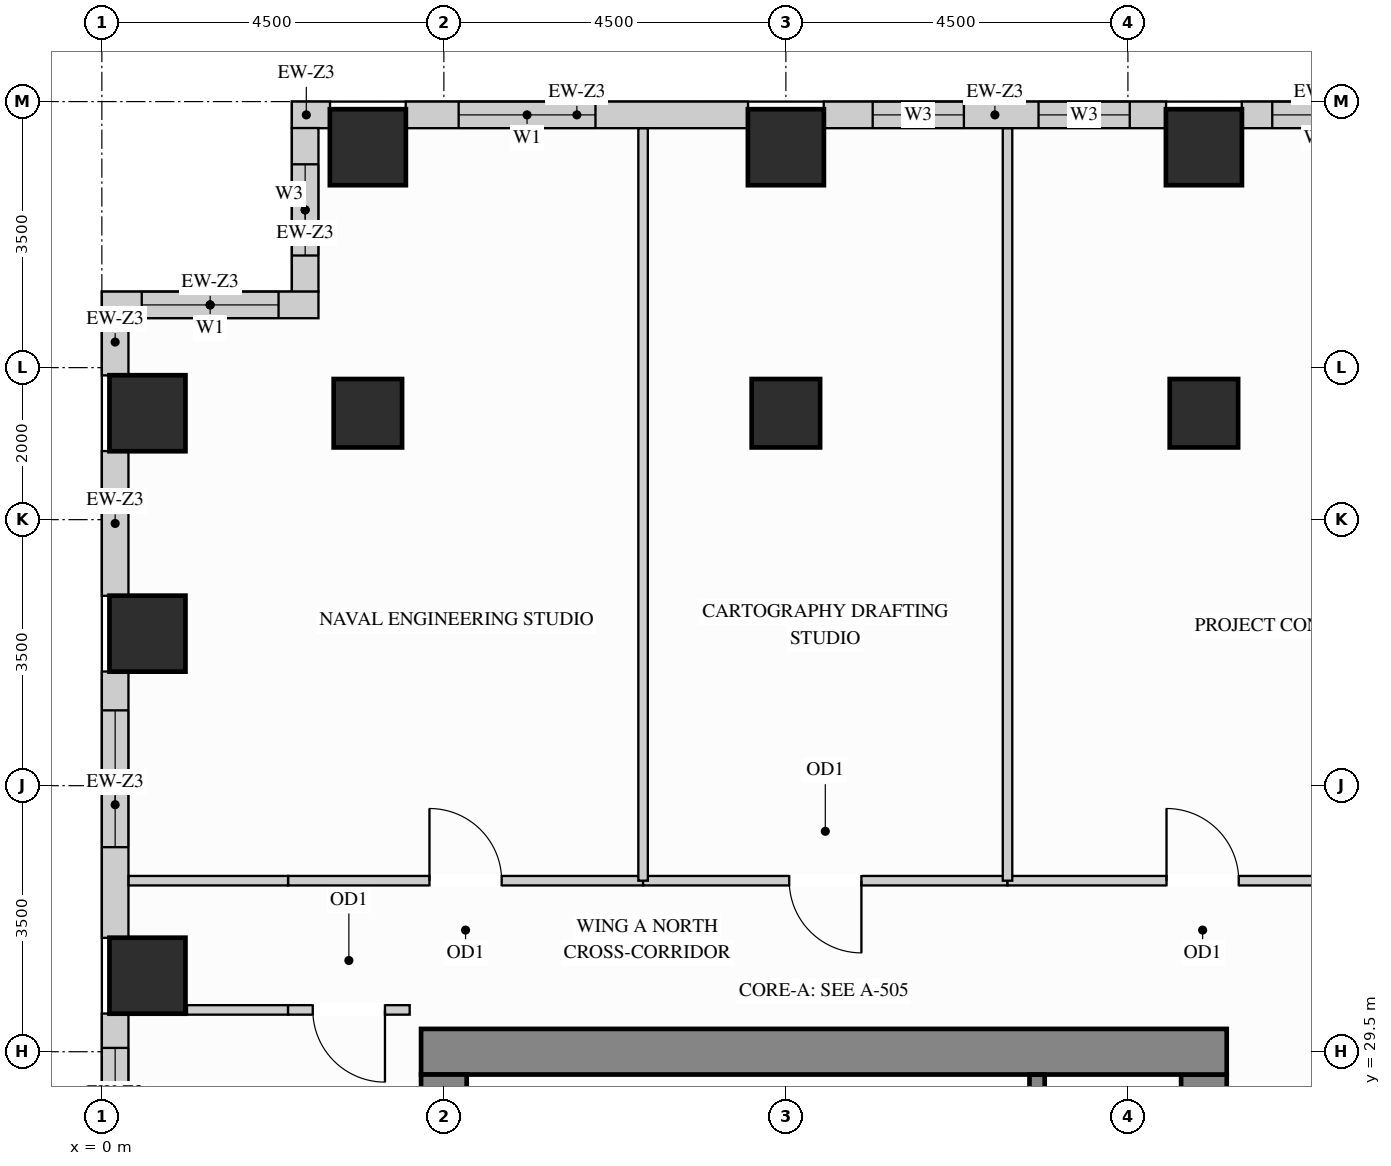
"""IFC4 building model, lengths in metres.
Left out: names, types, materials, properties, quantities, classifications, styles, units other than length and angle.
Written with IfcOpenShell. Run it as: python <this file> out.ifc"""

import sys

from ifc_helpers import new_model, si_unit, direction, frame, frame_2d, origin, origin_2d, place, context, subcontext, project, spatial, rectangle, extrude, source, transform, mapped, element, fill, save


model = new_model("IFC4")
c1 = context("Model", 3, precision=1e-05, world=origin(), true_north=direction((0.0, 1.0)))
c2 = subcontext(c1, "Body", "Model", "MODEL_VIEW")
j1 = project(units=[si_unit("LENGTHUNIT", "METRE"), si_unit("PLANEANGLEUNIT", "RADIAN")], contexts=[c1])
p1 = place(None, origin())
s1 = spatial("IfcSite", under=j1, at=p1, CompositionType="ELEMENT")
p2 = place(p1, origin())
s2 = spatial("IfcBuilding", under=s1, at=p2, CompositionType="ELEMENT")
p3 = place(p2, frame((0.0, 0.0, 200.7)))
s3 = spatial("IfcBuildingStorey", under=s2, at=p3, CompositionType="ELEMENT", Elevation=200.7)
m1 = source(origin(), c2, "Body", "SweptSolid", [
    extrude(rectangle(XDim=0.9, YDim=0.9, at=origin_2d()), origin(), (0.0, 0.0, 1.0), 3.4),
])
for number, where, z_axis, x_axis in (
    (1, (14.5, 37.9, 0.0), (0.0, 0.0, 1.0), (1.0, 0.0, 0.0)),
    (2, (3.5, 37.9, 0.0), (0.0, 0.0, 1.0), (1.0, 0.0, 0.0)),
    (3, (9.0, 37.9, 0.0), (0.0, 0.0, 1.0), (1.0, 0.0, 0.0)),
):
    element("IfcColumn", number, at=place(p3, frame(where, z_axis=z_axis, x_axis=x_axis)), inside=s3, PredefinedType="COLUMN", context=c2, shape_type="MappedRepresentation", body=[
        mapped(m1, transform((0.0, 0.0, 0.0), x_axis=(1.0, 0.0, 0.0), y_axis=(0.0, 1.0, 0.0), z_axis=(0.0, 0.0, 1.0))),
    ])
m2 = source(origin(), c2, "Body", "SweptSolid", [
    extrude(rectangle(XDim=1.0, YDim=1.0, at=origin_2d()), origin(), (0.0, 0.0, 1.0), 3.4),
])
for number, where, z_axis, x_axis in (
    (4, (14.5, 41.4, 0.0), (0.0, 0.0, 1.0), (1.0, 0.0, 0.0)),
    (5, (3.5, 41.4, 0.0), (0.0, 0.0, 1.0), (1.0, 0.0, 0.0)),
    (6, (9.0, 41.4, 0.0), (0.0, 0.0, 1.0), (1.0, 0.0, 0.0)),
    (7, (0.6, 30.5, 0.0), (0.0, 0.0, 1.0), (1.0, 0.0, 0.0)),
    (8, (0.6, 35.0, 0.0), (0.0, 0.0, 1.0), (1.0, 0.0, 0.0)),
    (9, (0.6, 37.9, 0.0), (0.0, 0.0, 1.0), (1.0, 0.0, 0.0)),
):
    element("IfcColumn", number, at=place(p3, frame(where, z_axis=z_axis, x_axis=x_axis)), inside=s3, PredefinedType="COLUMN", context=c2, shape_type="MappedRepresentation", body=[
        mapped(m2, transform((0.0, 0.0, 0.0), x_axis=(1.0, 0.0, 0.0), y_axis=(0.0, 1.0, 0.0), z_axis=(0.0, 0.0, 1.0))),
    ])
m3 = source(origin(), c2, "Body", "SweptSolid", [
    extrude(rectangle(XDim=8.32, YDim=0.6, at=frame_2d((4.16, 0.0))), origin(), (0.0, 0.0, 1.0), 3.4),
])
p4 = place(p3, frame((14.5, 20.88, 0.0), z_axis=(0.0, 0.0, 1.0), x_axis=(0.0, 1.0, 0.0)))
e10 = element("IfcWall", 10, at=p4, inside=s3, PredefinedType="SHEAR", context=c2, shape_type="MappedRepresentation", body=[
    mapped(m3, transform((0.0, 0.0, 0.0), x_axis=(1.0, 0.0, 0.0), y_axis=(0.0, 1.0, 0.0), z_axis=(0.0, 0.0, 1.0))),
])
m4 = source(origin(), c2, "Body", "SweptSolid", [
    extrude(rectangle(XDim=10.6, YDim=0.6, at=frame_2d((5.3, 0.0))), origin(), (0.0, 0.0, 1.0), 3.4),
])
p5 = place(p3, frame((4.2, 29.5, 0.0), z_axis=(0.0, 0.0, 1.0), x_axis=(1.0, 0.0, 0.0)))
e11 = element("IfcWall", 11, at=p5, inside=s3, PredefinedType="SHEAR", context=c2, shape_type="MappedRepresentation", body=[
    mapped(m4, transform((0.0, 0.0, 0.0), x_axis=(1.0, 0.0, 0.0), y_axis=(0.0, 1.0, 0.0), z_axis=(0.0, 0.0, 1.0))),
])
m5 = source(origin(), c2, "Body", "SweptSolid", [
    extrude(rectangle(XDim=20.4, YDim=0.6, at=frame_2d((10.2, 0.0))), origin(), (0.0, 0.0, 1.0), 3.4),
])
p6 = place(p3, frame((4.5, 8.8, 0.0), z_axis=(0.0, 0.0, 1.0), x_axis=(0.0, 1.0, 0.0)))
e12 = element("IfcWall", 12, at=p6, inside=s3, PredefinedType="SHEAR", context=c2, shape_type="MappedRepresentation", body=[
    mapped(m5, transform((0.0, 0.0, 0.0), x_axis=(1.0, 0.0, 0.0), y_axis=(0.0, 1.0, 0.0), z_axis=(0.0, 0.0, 1.0))),
])
p7 = place(p3, frame((17.0, 41.825, 0.0), z_axis=(0.0, 0.0, 1.0), x_axis=(-1.0, 0.0, 0.0)))
e13 = element("IfcWall", 13, at=p7, inside=s3, PredefinedType="SOLIDWALL", context=c2, shape_type="SweptSolid", body=[
    extrude(rectangle(XDim=2.002, YDim=0.35, at=frame_2d((1.001, 0.0))), origin(), (0.0, 0.0, 1.0), 3.385),
])
p8 = place(p7, frame((0.401, 0.0, 0.78)))
e14 = element("IfcOpeningElement", 14, at=p8, cuts=e13, PredefinedType="OPENING", context=c2, shape_type="SweptSolid", body=[
    extrude(rectangle(XDim=1.2, YDim=2.1, at=frame_2d((0.6, 1.05))), frame((0.0, 0.185, 0.0), z_axis=(0.0, -1.0, 0.0), x_axis=(1.0, 0.0, 0.0)), (0.0, 0.0, 1.0), 0.37),
])
p9 = place(p3, frame((14.002, 41.825, 0.0), z_axis=(0.0, 0.0, 1.0), x_axis=(-1.0, 0.0, 0.0)))
e15 = element("IfcWall", 15, at=p9, inside=s3, PredefinedType="SOLIDWALL", context=c2, shape_type="SweptSolid", body=[
    extrude(rectangle(XDim=4.504, YDim=0.35, at=frame_2d((2.252, 0.0))), origin(), (0.0, 0.0, 1.0), 2.612),
])
p10 = place(p9, frame((0.478, 0.0, 0.78)))
e16 = element("IfcOpeningElement", 16, at=p10, cuts=e15, PredefinedType="OPENING", context=c2, shape_type="SweptSolid", body=[
    extrude(rectangle(XDim=1.2, YDim=1.652, at=frame_2d((0.6, 0.826))), frame((0.0, 0.185, 0.0), z_axis=(0.0, -1.0, 0.0), x_axis=(1.0, 0.0, 0.0)), (0.0, 0.0, 1.0), 0.37),
])
p11 = place(p9, frame((2.66, 0.0, 0.78)))
e17 = element("IfcOpeningElement", 17, at=p11, cuts=e15, PredefinedType="OPENING", context=c2, shape_type="SweptSolid", body=[
    extrude(rectangle(XDim=1.2, YDim=1.652, at=frame_2d((0.6, 0.826))), frame((0.0, 0.185, 0.0), z_axis=(0.0, -1.0, 0.0), x_axis=(1.0, 0.0, 0.0)), (0.0, 0.0, 1.0), 0.37),
])
p12 = place(p3, frame((8.502, 41.825, 0.0), z_axis=(0.0, 0.0, 1.0), x_axis=(-1.0, 0.0, 0.0)))
e18 = element("IfcWall", 18, at=p12, inside=s3, PredefinedType="SOLIDWALL", context=c2, shape_type="SweptSolid", body=[
    extrude(rectangle(XDim=4.504, YDim=0.35, at=frame_2d((2.252, 0.0))), origin(), (0.0, 0.0, 1.0), 2.612),
])
p13 = place(p12, frame((2.008, 0.0, 0.78)))
e19 = element("IfcOpeningElement", 19, at=p13, cuts=e18, PredefinedType="OPENING", context=c2, shape_type="SweptSolid", body=[
    extrude(rectangle(XDim=1.8, YDim=1.652, at=frame_2d((0.9, 0.826))), frame((0.0, 0.185, 0.0), z_axis=(0.0, -1.0, 0.0), x_axis=(1.0, 0.0, 0.0)), (0.0, 0.0, 1.0), 0.37),
])
m6 = source(origin(), c2, "Body", "SweptSolid", [
    extrude(rectangle(XDim=0.502, YDim=0.35, at=frame_2d((0.251, 0.0))), origin(), (0.0, 0.0, 1.0), 3.385),
])
p14 = place(p3, frame((3.002, 41.825, 0.0), z_axis=(0.0, 0.0, 1.0), x_axis=(-1.0, 0.0, 0.0)))
e20 = element("IfcWall", 20, at=p14, inside=s3, PredefinedType="SOLIDWALL", context=c2, shape_type="MappedRepresentation", body=[
    mapped(m6, transform((0.0, 0.0, 0.0), x_axis=(1.0, 0.0, 0.0), y_axis=(0.0, 1.0, 0.0), z_axis=(0.0, 0.0, 1.0))),
])
p15 = place(p3, frame((2.675, 41.652, 0.0), z_axis=(0.0, 0.0, 1.0), x_axis=(0.0, -1.0, 0.0)))
e21 = element("IfcWall", 21, at=p15, inside=s3, PredefinedType="SOLIDWALL", context=c2, shape_type="SweptSolid", body=[
    extrude(rectangle(XDim=2.154, YDim=0.35, at=frame_2d((1.077, 0.0))), origin(), (0.0, 0.0, 1.0), 3.385),
])
p16 = place(p15, frame((0.477, 0.0, 0.78)))
e22 = element("IfcOpeningElement", 22, at=p16, cuts=e21, PredefinedType="OPENING", context=c2, shape_type="SweptSolid", body=[
    extrude(rectangle(XDim=1.2, YDim=2.1, at=frame_2d((0.6, 1.05))), frame((0.0, 0.185, 0.0), z_axis=(0.0, -1.0, 0.0), x_axis=(1.0, 0.0, 0.0)), (0.0, 0.0, 1.0), 0.37),
])
p17 = place(p3, frame((2.85, 39.325, 0.0), z_axis=(0.0, 0.0, 1.0), x_axis=(-1.0, 0.0, 0.0)))
e23 = element("IfcWall", 23, at=p17, inside=s3, PredefinedType="SOLIDWALL", context=c2, shape_type="SweptSolid", body=[
    extrude(rectangle(XDim=2.85, YDim=0.35, at=frame_2d((1.425, 0.0))), origin(), (0.0, 0.0, 1.0), 3.385),
])
p18 = place(p17, frame((0.525, 0.0, 0.78)))
e24 = element("IfcOpeningElement", 24, at=p18, cuts=e23, PredefinedType="OPENING", context=c2, shape_type="SweptSolid", body=[
    extrude(rectangle(XDim=1.8, YDim=2.1, at=frame_2d((0.9, 1.05))), frame((0.0, 0.185, 0.0), z_axis=(0.0, -1.0, 0.0), x_axis=(1.0, 0.0, 0.0)), (0.0, 0.0, 1.0), 0.37),
])
m7 = source(origin(), c2, "Body", "SweptSolid", [
    extrude(rectangle(XDim=0.754, YDim=0.35, at=frame_2d((0.377, 0.0))), origin(), (0.0, 0.0, 1.0), 3.385),
])
p19 = place(p3, frame((0.175, 39.152, 0.0), z_axis=(0.0, 0.0, 1.0), x_axis=(0.0, -1.0, 0.0)))
e25 = element("IfcWall", 25, at=p19, inside=s3, PredefinedType="SOLIDWALL", context=c2, shape_type="MappedRepresentation", body=[
    mapped(m7, transform((0.0, 0.0, 0.0), x_axis=(1.0, 0.0, 0.0), y_axis=(0.0, 1.0, 0.0), z_axis=(0.0, 0.0, 1.0))),
])
m8 = source(origin(), c2, "Body", "SweptSolid", [
    extrude(rectangle(XDim=1.904, YDim=0.35, at=frame_2d((0.952, 0.0))), origin(), (0.0, 0.0, 1.0), 2.612),
])
p20 = place(p3, frame((0.175, 37.402, 0.0), z_axis=(0.0, 0.0, 1.0), x_axis=(0.0, -1.0, 0.0)))
e26 = element("IfcWall", 26, at=p20, inside=s3, PredefinedType="SOLIDWALL", context=c2, shape_type="MappedRepresentation", body=[
    mapped(m8, transform((0.0, 0.0, 0.0), x_axis=(1.0, 0.0, 0.0), y_axis=(0.0, 1.0, 0.0), z_axis=(0.0, 0.0, 1.0))),
])
p21 = place(p3, frame((0.175, 34.502, 0.0), z_axis=(0.0, 0.0, 1.0), x_axis=(0.0, -1.0, 0.0)))
e27 = element("IfcWall", 27, at=p21, inside=s3, PredefinedType="SOLIDWALL", context=c2, shape_type="SweptSolid", body=[
    extrude(rectangle(XDim=3.504, YDim=0.35, at=frame_2d((1.752, 0.0))), origin(), (0.0, 0.0, 1.0), 2.612),
])
p22 = place(p21, frame((0.511, 0.0, 0.78)))
e28 = element("IfcOpeningElement", 28, at=p22, cuts=e27, PredefinedType="OPENING", context=c2, shape_type="SweptSolid", body=[
    extrude(rectangle(XDim=1.8, YDim=1.652, at=frame_2d((0.9, 0.826))), frame((0.0, 0.185, 0.0), z_axis=(0.0, -1.0, 0.0), x_axis=(1.0, 0.0, 0.0)), (0.0, 0.0, 1.0), 0.37),
])
p23 = place(p3, frame((0.175, 30.002, 0.0), z_axis=(0.0, 0.0, 1.0), x_axis=(0.0, -1.0, 0.0)))
e29 = element("IfcWall", 29, at=p23, inside=s3, PredefinedType="SOLIDWALL", context=c2, shape_type="SweptSolid", body=[
    extrude(rectangle(XDim=2.704, YDim=0.35, at=frame_2d((1.352, 0.0))), origin(), (0.0, 0.0, 1.0), 2.612),
])
p24 = place(p23, frame((0.452, 0.0, 0.78)))
e30 = element("IfcOpeningElement", 30, at=p24, cuts=e29, PredefinedType="OPENING", context=c2, shape_type="SweptSolid", body=[
    extrude(rectangle(XDim=1.8, YDim=1.652, at=frame_2d((0.9, 0.826))), frame((0.0, 0.185, 0.0), z_axis=(0.0, -1.0, 0.0), x_axis=(1.0, 0.0, 0.0)), (0.0, 0.0, 1.0), 0.37),
])
p25 = place(p3, frame((2.45, 31.75, 0.0), z_axis=(0.0, 0.0, 1.0), x_axis=(1.0, 0.0, 0.0)))
e31 = element("IfcWall", 31, at=p25, inside=s3, PredefinedType="PARTITIONING", context=c2, shape_type="SweptSolid", body=[
    extrude(rectangle(XDim=4.671, YDim=0.125, at=frame_2d((2.335, 0.0))), origin(), (0.0, 0.0, 1.0), 2.848),
])
p26 = place(p25, frame((1.861, 0.0, 0.0)))
e32 = element("IfcOpeningElement", 32, at=p26, cuts=e31, PredefinedType="OPENING", context=c2, shape_type="SweptSolid", body=[
    extrude(rectangle(XDim=0.95, YDim=2.15, at=frame_2d((0.475, 1.075))), frame((0.0, 0.073, 0.0), z_axis=(0.0, -1.0, 0.0), x_axis=(1.0, 0.0, 0.0)), (0.0, 0.0, 1.0), 0.145),
])
p27 = place(p3, frame((7.121, 31.75, 0.0), z_axis=(0.0, 0.0, 1.0), x_axis=(1.0, 0.0, 0.0)))
e33 = element("IfcWall", 33, at=p27, inside=s3, PredefinedType="PARTITIONING", context=c2, shape_type="SweptSolid", body=[
    extrude(rectangle(XDim=4.795, YDim=0.125, at=frame_2d((2.397, 0.0))), origin(), (0.0, 0.0, 1.0), 2.848),
])
p28 = place(p27, frame((1.923, 0.0, 0.0)))
e34 = element("IfcOpeningElement", 34, at=p28, cuts=e33, PredefinedType="OPENING", context=c2, shape_type="SweptSolid", body=[
    extrude(rectangle(XDim=0.95, YDim=2.15, at=frame_2d((0.475, 1.075))), frame((0.0, 0.073, 0.0), z_axis=(0.0, -1.0, 0.0), x_axis=(1.0, 0.0, 0.0)), (0.0, 0.0, 1.0), 0.145),
])
p29 = place(p3, frame((11.916, 31.75, 0.0), z_axis=(0.0, 0.0, 1.0), x_axis=(1.0, 0.0, 0.0)))
e35 = element("IfcWall", 35, at=p29, inside=s3, PredefinedType="PARTITIONING", context=c2, shape_type="SweptSolid", body=[
    extrude(rectangle(XDim=5.134, YDim=0.125, at=frame_2d((2.567, 0.0))), origin(), (0.0, 0.0, 1.0), 2.848),
])
p30 = place(p29, frame((2.092, 0.0, 0.0)))
e36 = element("IfcOpeningElement", 36, at=p30, cuts=e35, PredefinedType="OPENING", context=c2, shape_type="SweptSolid", body=[
    extrude(rectangle(XDim=0.95, YDim=2.15, at=frame_2d((0.475, 1.075))), frame((0.0, 0.073, 0.0), z_axis=(0.0, -1.0, 0.0), x_axis=(1.0, 0.0, 0.0)), (0.0, 0.0, 1.0), 0.145),
])
m9 = source(origin(), c2, "Body", "SweptSolid", [
    extrude(rectangle(XDim=2.098, YDim=0.125, at=frame_2d((1.049, 0.0))), origin(), (0.0, 0.0, 1.0), 2.848),
])
p31 = place(p3, frame((0.352, 31.75, 0.0), z_axis=(0.0, 0.0, 1.0), x_axis=(1.0, 0.0, 0.0)))
e37 = element("IfcWall", 37, at=p31, inside=s3, PredefinedType="PARTITIONING", context=c2, shape_type="MappedRepresentation", body=[
    mapped(m9, transform((0.0, 0.0, 0.0), x_axis=(1.0, 0.0, 0.0), y_axis=(0.0, 1.0, 0.0), z_axis=(0.0, 0.0, 1.0))),
])
m10 = source(origin(), c2, "Body", "SweptSolid", [
    extrude(rectangle(XDim=9.898, YDim=0.125, at=frame_2d((4.949, 0.0))), origin(), (0.0, 0.0, 1.0), 3.385),
])
for number, where, z_axis, x_axis in (
    (38, (7.121, 31.75, 0.0), (0.0, 0.0, 1.0), (0.0, 1.0, 0.0)),
    (39, (11.916, 31.75, 0.0), (0.0, 0.0, 1.0), (0.0, 1.0, 0.0)),
):
    element("IfcWall", number, at=place(p3, frame(where, z_axis=z_axis, x_axis=x_axis)), inside=s3, PredefinedType="PARTITIONING", context=c2, shape_type="MappedRepresentation", body=[
        mapped(m10, transform((0.0, 0.0, 0.0), x_axis=(1.0, 0.0, 0.0), y_axis=(0.0, 1.0, 0.0), z_axis=(0.0, 0.0, 1.0))),
    ])
m11 = source(origin(), c2, "Body", "SweptSolid", [
    extrude(rectangle(XDim=1.33, YDim=0.125, at=frame_2d((0.665, 0.0))), origin(), (0.0, 0.0, 1.0), 3.385),
])
p32 = place(p3, frame((1.12, 30.05, 0.0), z_axis=(0.0, 0.0, 1.0), x_axis=(1.0, 0.0, 0.0)))
e40 = element("IfcWall", 40, at=p32, inside=s3, PredefinedType="PARTITIONING", context=c2, shape_type="MappedRepresentation", body=[
    mapped(m11, transform((0.0, 0.0, 0.0), x_axis=(1.0, 0.0, 0.0), y_axis=(0.0, 1.0, 0.0), z_axis=(0.0, 0.0, 1.0))),
])
p33 = place(p3, frame((2.45, 30.05, 0.0), z_axis=(0.0, 0.0, 1.0), x_axis=(1.0, 0.0, 0.0)))
e41 = element("IfcWall", 41, at=p33, inside=s3, PredefinedType="PARTITIONING", context=c2, shape_type="SweptSolid", body=[
    extrude(rectangle(XDim=1.6, YDim=0.125, at=frame_2d((0.8, 0.0))), origin(), (0.0, 0.0, 1.0), 3.385),
])
p34 = place(p33, frame((0.325, 0.0, 0.0)))
e42 = element("IfcOpeningElement", 42, at=p34, cuts=e41, PredefinedType="OPENING", context=c2, shape_type="SweptSolid", body=[
    extrude(rectangle(XDim=0.95, YDim=2.15, at=frame_2d((0.475, 1.075))), frame((0.0, 0.073, 0.0), z_axis=(0.0, -1.0, 0.0), x_axis=(1.0, 0.0, 0.0)), (0.0, 0.0, 1.0), 0.145),
])
m12 = source(origin(), c2, "Body", "SweptSolid", [
    extrude(rectangle(XDim=3.753, YDim=0.2, at=frame_2d((1.876, 0.0))), origin(), (0.0, 0.0, 1.0), 3.4),
])
p35 = place(p3, frame((12.305, 25.445, 0.0), z_axis=(0.0, 0.0, 1.0), x_axis=(0.0, 1.0, 0.0)))
e43 = element("IfcWall", 43, at=p35, inside=s3, PredefinedType="SHEAR", context=c2, shape_type="MappedRepresentation", body=[
    mapped(m12, transform((0.0, 0.0, 0.0), x_axis=(1.0, 0.0, 0.0), y_axis=(0.0, 1.0, 0.0), z_axis=(0.0, 0.0, 1.0))),
])
m13 = source(origin(), c2, "Body", "SweptSolid", [
    extrude(rectangle(XDim=0.95, YDim=2.15, at=frame_2d((0.475, 1.075))), frame((0.0, 0.025, 0.0), z_axis=(0.0, -1.0, 0.0), x_axis=(1.0, 0.0, 0.0)), (0.0, 0.0, 1.0), 0.05),
])
p36 = place(p26, origin())
e44 = element("IfcDoor", 44, at=p36, inside=s3, OperationType="SINGLE_SWING_LEFT", PredefinedType="DOOR", context=c2, shape_type="MappedRepresentation", body=[
    mapped(m13, transform((0.0, 0.0, 0.0), x_axis=(1.0, 0.0, 0.0), y_axis=(0.0, 1.0, 0.0), z_axis=(0.0, 0.0, 1.0))),
])
fill(e32, e44)
p37 = place(p28, origin())
e45 = element("IfcDoor", 45, at=p37, inside=s3, OperationType="SINGLE_SWING_RIGHT", PredefinedType="DOOR", context=c2, shape_type="MappedRepresentation", body=[
    mapped(m13, transform((0.0, 0.0, 0.0), x_axis=(1.0, 0.0, 0.0), y_axis=(0.0, 1.0, 0.0), z_axis=(0.0, 0.0, 1.0))),
])
fill(e34, e45)
p38 = place(p30, origin())
e46 = element("IfcDoor", 46, at=p38, inside=s3, OperationType="SINGLE_SWING_LEFT", PredefinedType="DOOR", context=c2, shape_type="MappedRepresentation", body=[
    mapped(m13, transform((0.0, 0.0, 0.0), x_axis=(1.0, 0.0, 0.0), y_axis=(0.0, 1.0, 0.0), z_axis=(0.0, 0.0, 1.0))),
])
fill(e36, e46)
p39 = place(p34, origin())
e47 = element("IfcDoor", 47, at=p39, inside=s3, OperationType="SINGLE_SWING_RIGHT", PredefinedType="DOOR", context=c2, shape_type="MappedRepresentation", body=[
    mapped(m13, transform((0.0, 0.0, 0.0), x_axis=(1.0, 0.0, 0.0), y_axis=(0.0, 1.0, 0.0), z_axis=(0.0, 0.0, 1.0))),
])
fill(e42, e47)
m14 = source(origin(), c2, "Body", "SweptSolid", [
    extrude(rectangle(XDim=1.8, YDim=1.652, at=frame_2d((0.9, 0.826))), frame((0.0, 0.03, 0.0), z_axis=(0.0, -1.0, 0.0), x_axis=(1.0, 0.0, 0.0)), (0.0, 0.0, 1.0), 0.06),
])
p40 = place(p13, origin())
e48 = element("IfcWindow", 48, at=p40, inside=s3, PartitioningType="SINGLE_PANEL", PredefinedType="WINDOW", context=c2, shape_type="MappedRepresentation", body=[
    mapped(m14, transform((0.0, 0.0, 0.0), x_axis=(1.0, 0.0, 0.0), y_axis=(0.0, 1.0, 0.0), z_axis=(0.0, 0.0, 1.0))),
])
fill(e19, e48)
m15 = source(origin(), c2, "Body", "SweptSolid", [
    extrude(rectangle(XDim=1.8, YDim=2.1, at=frame_2d((0.9, 1.05))), frame((0.0, 0.03, 0.0), z_axis=(0.0, -1.0, 0.0), x_axis=(1.0, 0.0, 0.0)), (0.0, 0.0, 1.0), 0.06),
])
p41 = place(p18, origin())
e49 = element("IfcWindow", 49, at=p41, inside=s3, PartitioningType="SINGLE_PANEL", PredefinedType="WINDOW", context=c2, shape_type="MappedRepresentation", body=[
    mapped(m15, transform((0.0, 0.0, 0.0), x_axis=(1.0, 0.0, 0.0), y_axis=(0.0, 1.0, 0.0), z_axis=(0.0, 0.0, 1.0))),
])
fill(e24, e49)
p42 = place(p22, origin())
e50 = element("IfcWindow", 50, at=p42, inside=s3, PartitioningType="SINGLE_PANEL", PredefinedType="WINDOW", context=c2, shape_type="MappedRepresentation", body=[
    mapped(m14, transform((0.0, 0.0, 0.0), x_axis=(1.0, 0.0, 0.0), y_axis=(0.0, 1.0, 0.0), z_axis=(0.0, 0.0, 1.0))),
])
fill(e28, e50)
p43 = place(p24, origin())
e51 = element("IfcWindow", 51, at=p43, inside=s3, PartitioningType="SINGLE_PANEL", PredefinedType="WINDOW", context=c2, shape_type="MappedRepresentation", body=[
    mapped(m14, transform((0.0, 0.0, 0.0), x_axis=(1.0, 0.0, 0.0), y_axis=(0.0, 1.0, 0.0), z_axis=(0.0, 0.0, 1.0))),
])
fill(e30, e51)
m16 = source(origin(), c2, "Body", "SweptSolid", [
    extrude(rectangle(XDim=1.2, YDim=2.1, at=frame_2d((0.6, 1.05))), frame((0.0, 0.03, 0.0), z_axis=(0.0, -1.0, 0.0), x_axis=(1.0, 0.0, 0.0)), (0.0, 0.0, 1.0), 0.06),
])
p44 = place(p8, origin())
e52 = element("IfcWindow", 52, at=p44, inside=s3, PartitioningType="SINGLE_PANEL", PredefinedType="WINDOW", context=c2, shape_type="MappedRepresentation", body=[
    mapped(m16, transform((0.0, 0.0, 0.0), x_axis=(1.0, 0.0, 0.0), y_axis=(0.0, 1.0, 0.0), z_axis=(0.0, 0.0, 1.0))),
])
fill(e14, e52)
m17 = source(origin(), c2, "Body", "SweptSolid", [
    extrude(rectangle(XDim=1.2, YDim=1.652, at=frame_2d((0.6, 0.826))), frame((0.0, 0.03, 0.0), z_axis=(0.0, -1.0, 0.0), x_axis=(1.0, 0.0, 0.0)), (0.0, 0.0, 1.0), 0.06),
])
p45 = place(p10, origin())
e53 = element("IfcWindow", 53, at=p45, inside=s3, PartitioningType="SINGLE_PANEL", PredefinedType="WINDOW", context=c2, shape_type="MappedRepresentation", body=[
    mapped(m17, transform((0.0, 0.0, 0.0), x_axis=(1.0, 0.0, 0.0), y_axis=(0.0, 1.0, 0.0), z_axis=(0.0, 0.0, 1.0))),
])
fill(e16, e53)
p46 = place(p11, origin())
e54 = element("IfcWindow", 54, at=p46, inside=s3, PartitioningType="SINGLE_PANEL", PredefinedType="WINDOW", context=c2, shape_type="MappedRepresentation", body=[
    mapped(m17, transform((0.0, 0.0, 0.0), x_axis=(1.0, 0.0, 0.0), y_axis=(0.0, 1.0, 0.0), z_axis=(0.0, 0.0, 1.0))),
])
fill(e17, e54)
p47 = place(p16, origin())
e55 = element("IfcWindow", 55, at=p47, inside=s3, PartitioningType="SINGLE_PANEL", PredefinedType="WINDOW", context=c2, shape_type="MappedRepresentation", body=[
    mapped(m16, transform((0.0, 0.0, 0.0), x_axis=(1.0, 0.0, 0.0), y_axis=(0.0, 1.0, 0.0), z_axis=(0.0, 0.0, 1.0))),
])
fill(e22, e55)
save(model, sys.argv[1])
